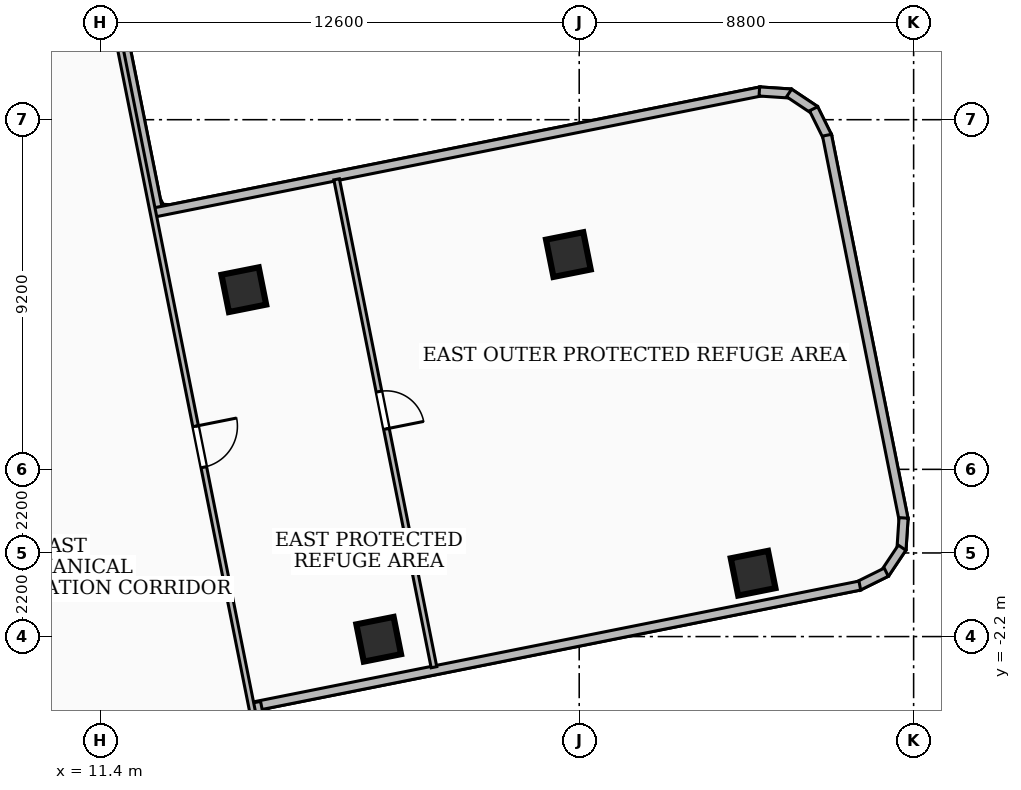
"""IFC4 building model, lengths in metres.
Left out: names, types, materials, properties, quantities, classifications, styles, units other than length and angle.
Written with IfcOpenShell. Run it as: python <this file> out.ifc"""

import sys

from ifc_helpers import new_model, si_unit, direction, frame, frame_2d, origin, origin_2d, place, context, subcontext, project, spatial, rectangle, extrude, element, fill, save


model = new_model("IFC4")
c1 = context("Model", 3, precision=1e-05, world=origin(), true_north=direction((0.0, 1.0)))
c2 = subcontext(c1, "Body", "Model", "MODEL_VIEW")
j1 = project(units=[si_unit("LENGTHUNIT", "METRE"), si_unit("PLANEANGLEUNIT", "RADIAN")], contexts=[c1])
p1 = place(None, origin())
s1 = spatial("IfcSite", under=j1, at=p1, CompositionType="ELEMENT")
p2 = place(p1, origin())
s2 = spatial("IfcBuilding", under=s1, at=p2, CompositionType="ELEMENT")
p3 = place(p2, frame((0.0, 0.0, 107.28)))
s3 = spatial("IfcBuildingStorey", under=s2, at=p3, CompositionType="ELEMENT", Elevation=107.28)
for number, where, z_axis, x_axis in (
    (1, (18.724, -2.271, 0.0), (0.0, 0.0, 1.0), (0.981, 0.196, 0.0)),
    (2, (15.175, 6.927, 0.0), (0.0, 0.0, 1.0), (0.981, 0.196, 0.0)),
    (3, (28.576, -0.533, 0.0), (0.0, 0.0, 1.0), (0.981, 0.196, 0.0)),
    (4, (23.715, 7.851, 0.0), (0.0, 0.0, 1.0), (0.981, 0.196, 0.0)),
):
    element("IfcColumn", number, at=place(p3, frame(where, z_axis=z_axis, x_axis=x_axis)), inside=s3, PredefinedType="COLUMN", context=c2, shape_type="SweptSolid", body=[
        extrude(rectangle(XDim=1.0, YDim=1.0, at=origin_2d()), origin(), (0.0, 0.0, 1.0), 4.68),
    ])
p4 = place(p3, frame((11.616, 15.532, 0.0), z_axis=(0.0, 0.0, 1.0), x_axis=(0.195679596911, -0.980667882289, 0.0)))
e5 = element("IfcWall", 5, at=p4, inside=s3, PredefinedType="SOLIDWALL", context=c2, shape_type="SweptSolid", body=[
    extrude(rectangle(XDim=6.776, YDim=0.24, at=frame_2d((3.388, 0.0))), origin(), (0.0, 0.0, 1.0), 2.212),
])
p5 = place(p3, frame((12.829, 8.962, 0.0), z_axis=(0.0, 0.0, 1.0), x_axis=(0.980676331544, 0.195637247858, 0.0)))
e6 = element("IfcWall", 6, at=p5, inside=s3, PredefinedType="SOLIDWALL", context=c2, shape_type="SweptSolid", body=[
    extrude(rectangle(XDim=16.275, YDim=0.24, at=frame_2d((8.138, 0.0))), origin(), (0.0, 0.0, 1.0), 2.212),
])
p6 = place(p3, frame((28.74, 12.143, 0.0), z_axis=(0.0, 0.0, 1.0), x_axis=(0.997792951373, -0.06640200442, 0.0)))
e7 = element("IfcWall", 7, at=p6, inside=s3, PredefinedType="SOLIDWALL", context=c2, shape_type="SweptSolid", body=[
    extrude(rectangle(XDim=0.831, YDim=0.24, at=frame_2d((0.416, 0.0))), origin(), (0.0, 0.0, 1.0), 4.42),
])
p7 = place(p3, frame((29.523, 12.104, 0.0), z_axis=(0.0, 0.0, 1.0), x_axis=(0.831727143475, -0.555184616867, 0.0)))
e8 = element("IfcWall", 8, at=p7, inside=s3, PredefinedType="SOLIDWALL", context=c2, shape_type="SweptSolid", body=[
    extrude(rectangle(XDim=0.814, YDim=0.24, at=frame_2d((0.407, 0.0))), origin(), (0.0, 0.0, 1.0), 4.42),
])
p8 = place(p3, frame((30.168, 11.688, 0.0), z_axis=(0.0, 0.0, 1.0), x_axis=(0.443794266413, -0.896128701191, 0.0)))
e9 = element("IfcWall", 9, at=p8, inside=s3, PredefinedType="SOLIDWALL", context=c2, shape_type="SweptSolid", body=[
    extrude(rectangle(XDim=0.829, YDim=0.24, at=frame_2d((0.415, 0.0))), origin(), (0.0, 0.0, 1.0), 4.42),
])
p9 = place(p3, frame((30.52, 10.992, 0.0), z_axis=(0.0, 0.0, 1.0), x_axis=(0.195565576703, -0.980690626655, 0.0)))
e10 = element("IfcWall", 10, at=p9, inside=s3, PredefinedType="SOLIDWALL", context=c2, shape_type="SweptSolid", body=[
    extrude(rectangle(XDim=10.319, YDim=0.24, at=frame_2d((5.16, 0.0))), origin(), (0.0, 0.0, 1.0), 4.42),
])
p10 = place(p3, frame((32.535, 0.922, 0.0), z_axis=(0.0, 0.0, 1.0), x_axis=(-0.066109477186, -0.997812375663, 0.0)))
e11 = element("IfcWall", 11, at=p10, inside=s3, PredefinedType="SOLIDWALL", context=c2, shape_type="SweptSolid", body=[
    extrude(rectangle(XDim=0.831, YDim=0.24, at=frame_2d((0.416, 0.0))), origin(), (0.0, 0.0, 1.0), 4.42),
])
p11 = place(p3, frame((32.496, 0.139, 0.0), z_axis=(0.0, 0.0, 1.0), x_axis=(-0.555392052936, -0.831588640817, 0.0)))
e12 = element("IfcWall", 12, at=p11, inside=s3, PredefinedType="SOLIDWALL", context=c2, shape_type="SweptSolid", body=[
    extrude(rectangle(XDim=0.814, YDim=0.24, at=frame_2d((0.407, 0.0))), origin(), (0.0, 0.0, 1.0), 4.42),
])
p12 = place(p3, frame((32.08, -0.506, 0.0), z_axis=(0.0, 0.0, 1.0), x_axis=(-0.896186678749, -0.443677176371, 0.0)))
e13 = element("IfcWall", 13, at=p12, inside=s3, PredefinedType="SOLIDWALL", context=c2, shape_type="SweptSolid", body=[
    extrude(rectangle(XDim=0.829, YDim=0.24, at=frame_2d((0.415, 0.0))), origin(), (0.0, 0.0, 1.0), 4.42),
])
p13 = place(p3, frame((31.384, -0.858, 0.0), z_axis=(0.0, 0.0, 1.0), x_axis=(-0.980678627862, -0.195625736687, 0.0)))
e14 = element("IfcWall", 14, at=p13, inside=s3, PredefinedType="SOLIDWALL", context=c2, shape_type="SweptSolid", body=[
    extrude(rectangle(XDim=16.276, YDim=0.24, at=frame_2d((8.138, 0.0))), origin(), (0.0, 0.0, 1.0), 2.212),
])
p14 = place(p3, frame((15.497, -3.929, 0.0), z_axis=(0.0, 0.0, 1.0), x_axis=(0.19569881616, -0.98066404714, 0.0)))
e15 = element("IfcWall", 15, at=p14, inside=s3, PredefinedType="SOLIDWALL", context=c2, shape_type="SweptSolid", body=[
    extrude(rectangle(XDim=6.075, YDim=0.24, at=frame_2d((3.038, 0.0))), origin(), (0.0, 0.0, 1.0), 2.212),
])
p15 = place(p3, frame((11.931, 13.24, 0.0), z_axis=(0.0, 0.0, 1.0), x_axis=(0.19557824927, -0.980688099455, 0.0)))
e16 = element("IfcWall", 16, at=p15, inside=s3, PredefinedType="PARTITIONING", context=c2, shape_type="SweptSolid", body=[
    extrude(rectangle(XDim=20.601, YDim=0.15, at=frame_2d((10.3, 0.0))), origin(), (0.0, 0.0, 1.0), 2.212),
])
p16 = place(p15, frame((10.1, 0.0, 0.0)))
e17 = element("IfcOpeningElement", 17, at=p16, cuts=e16, PredefinedType="OPENING", context=c2, shape_type="SweptSolid", body=[
    extrude(rectangle(XDim=1.1, YDim=2.15, at=frame_2d((0.55, 1.075))), frame((0.0, 0.085, 0.0), z_axis=(0.0, -1.0, 0.0), x_axis=(1.0, 0.0, 0.0)), (0.0, 0.0, 1.0), 0.17),
])
p17 = place(p3, frame((17.617, 9.831, 0.0), z_axis=(0.0, 0.0, 1.0), x_axis=(0.195646257456, -0.980674534157, 0.0)))
e18 = element("IfcWall", 18, at=p17, inside=s3, PredefinedType="PARTITIONING", context=c2, shape_type="SweptSolid", body=[
    extrude(rectangle(XDim=13.09, YDim=0.15, at=frame_2d((6.545, 0.0))), origin(), (0.0, 0.0, 1.0), 2.212),
])
p18 = place(p17, frame((5.695, 0.0, 0.0)))
e19 = element("IfcOpeningElement", 19, at=p18, cuts=e18, PredefinedType="OPENING", context=c2, shape_type="SweptSolid", body=[
    extrude(rectangle(XDim=1.0, YDim=2.1, at=frame_2d((0.5, 1.05))), frame((0.0, 0.085, 0.0), z_axis=(0.0, -1.0, 0.0), x_axis=(1.0, 0.0, 0.0)), (0.0, 0.0, 1.0), 0.17),
])
p19 = place(p16, origin())
e20 = element("IfcDoor", 20, at=p19, inside=s3, OperationType="SINGLE_SWING_LEFT", PredefinedType="DOOR", context=c2, shape_type="SweptSolid", body=[
    extrude(rectangle(XDim=1.1, YDim=2.15, at=frame_2d((0.55, 1.075))), frame((0.0, 0.025, 0.0), z_axis=(0.0, -1.0, 0.0), x_axis=(1.0, 0.0, 0.0)), (0.0, 0.0, 1.0), 0.05),
])
fill(e17, e20)
p20 = place(p18, origin())
e21 = element("IfcDoor", 21, at=p20, inside=s3, OperationType="SINGLE_SWING_RIGHT", PredefinedType="DOOR", context=c2, shape_type="SweptSolid", body=[
    extrude(rectangle(XDim=1.0, YDim=2.1, at=frame_2d((0.5, 1.05))), frame((0.0, 0.025, 0.0), z_axis=(0.0, -1.0, 0.0), x_axis=(1.0, 0.0, 0.0)), (0.0, 0.0, 1.0), 0.05),
])
fill(e19, e21)
save(model, sys.argv[1])
